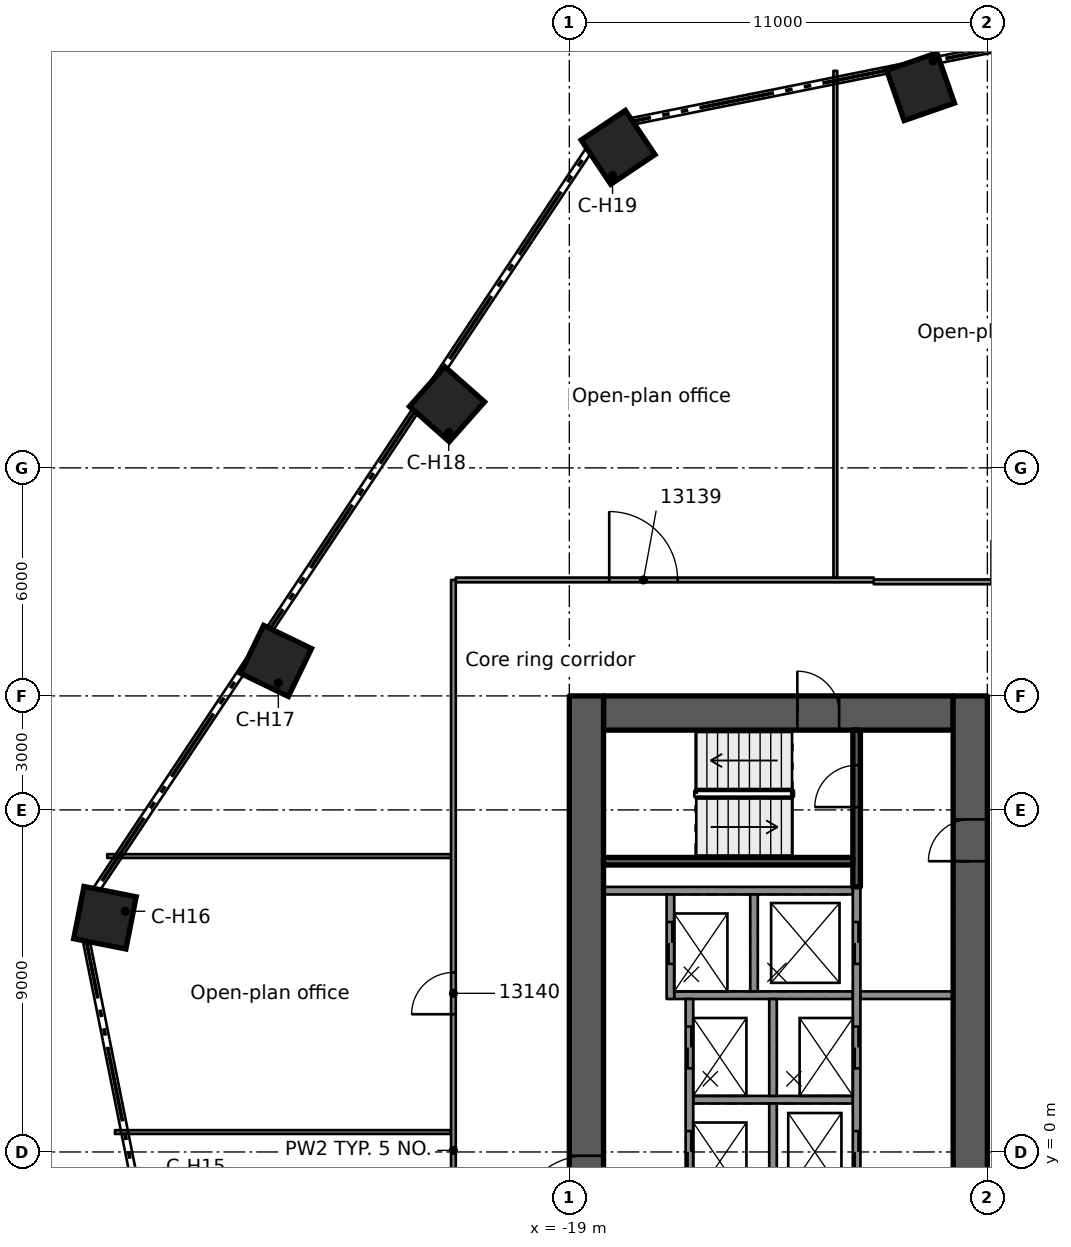
"""IFC4 building model, lengths in metres.
Left out: names, types, materials, properties, quantities, classifications, styles, units other than length and angle.
Written with IfcOpenShell. Run it as: python <this file> out.ifc"""

import sys

from ifc_helpers import new_model, si_unit, direction, frame, frame_2d, origin, origin_2d, place, context, subcontext, project, spatial, rectangle, extrude, element, fill, save


model = new_model("IFC4")
c1 = context("Model", 3, precision=1e-05, world=origin(), true_north=direction((0.0, 1.0)))
c2 = subcontext(c1, "Body", "Model", "MODEL_VIEW")
j1 = project(units=[si_unit("LENGTHUNIT", "METRE"), si_unit("PLANEANGLEUNIT", "RADIAN")], contexts=[c1])
p1 = place(None, origin())
s1 = spatial("IfcSite", under=j1, at=p1, CompositionType="ELEMENT")
p2 = place(p1, origin())
s2 = spatial("IfcBuilding", under=s1, at=p2, CompositionType="ELEMENT")
p3 = place(p2, frame((0.0, 0.0, 62.3)))
s3 = spatial("IfcBuildingStorey", under=s2, at=p3, CompositionType="ELEMENT", Elevation=62.3)
p4 = place(p3, frame((-18.1, 11.55, 0.0), z_axis=(0.0, 0.0, 1.0), x_axis=(1.0, 0.0, 0.0)))
e1 = element("IfcWall", 1, at=p4, inside=s3, PredefinedType="SHEAR", context=c2, shape_type="SweptSolid", body=[
    extrude(rectangle(XDim=9.2, YDim=0.9, at=frame_2d((4.6, 0.0))), origin(), (0.0, 0.0, 1.0), 3.5),
])
p5 = place(p4, frame((5.1, 0.0, 0.0)))
e2 = element("IfcOpeningElement", 2, at=p5, cuts=e1, PredefinedType="OPENING", context=c2, shape_type="SweptSolid", body=[
    extrude(rectangle(XDim=1.1, YDim=2.1, at=frame_2d((0.55, 1.05))), frame((0.0, 0.46, 0.0), z_axis=(0.0, -1.0, 0.0), x_axis=(1.0, 0.0, 0.0)), (0.0, 0.0, 1.0), 0.92),
])
p6 = place(p3, frame((-18.55, -12.0, 0.0), z_axis=(0.0, 0.0, 1.0), x_axis=(0.0, 1.0, 0.0)))
e3 = element("IfcWall", 3, at=p6, inside=s3, PredefinedType="SHEAR", context=c2, shape_type="SweptSolid", body=[
    extrude(rectangle(XDim=24.0, YDim=0.9, at=frame_2d((12.0, 0.0))), origin(), (0.0, 0.0, 1.0), 3.5),
])
p7 = place(p6, frame((10.1, 0.0, 0.0)))
e4 = element("IfcOpeningElement", 4, at=p7, cuts=e3, PredefinedType="OPENING", context=c2, shape_type="SweptSolid", body=[
    extrude(rectangle(XDim=1.8, YDim=2.1, at=frame_2d((0.9, 1.05))), frame((0.0, 0.46, 0.0), z_axis=(0.0, -1.0, 0.0), x_axis=(1.0, 0.0, 0.0)), (0.0, 0.0, 1.0), 0.92),
])
p8 = place(p3, frame((-8.45, -12.0, 0.0), z_axis=(0.0, 0.0, 1.0), x_axis=(0.0, 1.0, 0.0)))
e5 = element("IfcWall", 5, at=p8, inside=s3, PredefinedType="SHEAR", context=c2, shape_type="SweptSolid", body=[
    extrude(rectangle(XDim=24.0, YDim=0.9, at=frame_2d((12.0, 0.0))), origin(), (0.0, 0.0, 1.0), 3.5),
])
p9 = place(p8, frame((9.6, 0.0, 0.0)))
e6 = element("IfcOpeningElement", 6, at=p9, cuts=e5, PredefinedType="OPENING", context=c2, shape_type="SweptSolid", body=[
    extrude(rectangle(XDim=1.8, YDim=2.1, at=frame_2d((0.9, 1.05))), frame((0.0, 0.46, 0.0), z_axis=(0.0, -1.0, 0.0), x_axis=(1.0, 0.0, 0.0)), (0.0, 0.0, 1.0), 0.92),
])
p10 = place(p8, frame((19.65, 0.0, 0.0)))
e7 = element("IfcOpeningElement", 7, at=p10, cuts=e5, PredefinedType="OPENING", context=c2, shape_type="SweptSolid", body=[
    extrude(rectangle(XDim=1.1, YDim=2.1, at=frame_2d((0.55, 1.05))), frame((0.0, 0.46, 0.0), z_axis=(0.0, -1.0, 0.0), x_axis=(1.0, 0.0, 0.0)), (0.0, 0.0, 1.0), 0.92),
])
for number, where, z_axis, x_axis in (
    (8, (-31.22, 6.163, 0.0), (0.0, 0.0, 1.0), (-0.981, 0.194, 0.0)),
    (9, (-26.719, 12.92, 0.0), (0.0, 0.0, 1.0), (-0.9, 0.435, 0.0)),
    (10, (-22.219, 19.677, 0.0), (0.0, 0.0, 1.0), (-0.749, 0.663, 0.0)),
    (11, (-17.718, 26.434, 0.0), (0.0, 0.0, 1.0), (-0.557, 0.831, 0.0)),
    (12, (-9.758, 28.029, 0.0), (0.0, 0.0, 1.0), (-0.329, 0.944, 0.0)),
):
    element("IfcColumn", number, at=place(p3, frame(where, z_axis=z_axis, x_axis=x_axis)), inside=s3, PredefinedType="COLUMN", context=c2, shape_type="SweptSolid", body=[
        extrude(rectangle(XDim=1.4, YDim=1.4, at=origin_2d()), origin(), (0.0, 0.0, 1.0), 3.5),
    ])
p11 = place(p3, frame((-11.54, 6.875, 0.0), z_axis=(0.0, 0.0, 1.0), x_axis=(-1.0, 0.0, 0.0)))
e13 = element("IfcWall", 13, at=p11, inside=s3, PredefinedType="SOLIDWALL", context=c2, shape_type="SweptSolid", body=[
    extrude(rectangle(XDim=6.56, YDim=0.2, at=frame_2d((3.28, 0.0))), origin(), (0.0, 0.0, 1.0), 3.09),
])
p12 = place(p3, frame((-11.54, 1.375, 0.0), z_axis=(0.0, 0.0, 1.0), x_axis=(-1.0, 0.0, 0.0)))
e14 = element("IfcWall", 14, at=p12, inside=s3, PredefinedType="SOLIDWALL", context=c2, shape_type="SweptSolid", body=[
    extrude(rectangle(XDim=4.2, YDim=0.2, at=frame_2d((2.1, 0.0))), origin(), (0.0, 0.0, 1.0), 3.09),
])
p13 = place(p3, frame((-11.54, 4.125, 0.0), z_axis=(0.0, 0.0, 1.0), x_axis=(-1.0, 0.0, 0.0)))
e15 = element("IfcWall", 15, at=p13, inside=s3, PredefinedType="SOLIDWALL", context=c2, shape_type="SweptSolid", body=[
    extrude(rectangle(XDim=4.7, YDim=0.2, at=frame_2d((2.35, 0.0))), origin(), (0.0, 0.0, 1.0), 3.09),
])
p14 = place(p3, frame((-11.44, -6.975, 0.0), z_axis=(0.0, 0.0, 1.0), x_axis=(0.0, 1.0, 0.0)))
e16 = element("IfcWall", 16, at=p14, inside=s3, PredefinedType="SOLIDWALL", context=c2, shape_type="SweptSolid", body=[
    extrude(rectangle(XDim=13.95, YDim=0.2, at=frame_2d((6.975, 0.0))), origin(), (0.0, 0.0, 1.0), 3.09),
])
p15 = place(p14, frame((6.425, 0.0, 0.0)))
e17 = element("IfcOpeningElement", 17, at=p15, cuts=e16, PredefinedType="OPENING", context=c2, shape_type="SweptSolid", body=[
    extrude(rectangle(XDim=1.1, YDim=2.1, at=frame_2d((0.55, 1.05))), frame((0.0, 0.11, 0.0), z_axis=(0.0, -1.0, 0.0), x_axis=(1.0, 0.0, 0.0)), (0.0, 0.0, 1.0), 0.22),
])
p16 = place(p14, frame((9.175, 0.0, 0.0)))
e18 = element("IfcOpeningElement", 18, at=p16, cuts=e16, PredefinedType="OPENING", context=c2, shape_type="SweptSolid", body=[
    extrude(rectangle(XDim=1.1, YDim=2.1, at=frame_2d((0.55, 1.05))), frame((0.0, 0.11, 0.0), z_axis=(0.0, -1.0, 0.0), x_axis=(1.0, 0.0, 0.0)), (0.0, 0.0, 1.0), 0.22),
])
p17 = place(p14, frame((11.925, 0.0, 0.0)))
e19 = element("IfcOpeningElement", 19, at=p17, cuts=e16, PredefinedType="OPENING", context=c2, shape_type="SweptSolid", body=[
    extrude(rectangle(XDim=1.1, YDim=2.1, at=frame_2d((0.55, 1.05))), frame((0.0, 0.11, 0.0), z_axis=(0.0, -1.0, 0.0), x_axis=(1.0, 0.0, 0.0)), (0.0, 0.0, 1.0), 0.22),
])
p18 = place(p14, frame((1.075, 0.0, 0.0)))
e20 = element("IfcOpeningElement", 20, at=p18, cuts=e16, PredefinedType="OPENING", context=c2, shape_type="SweptSolid", body=[
    extrude(rectangle(XDim=0.8, YDim=2.1, at=frame_2d((0.4, 1.05))), frame((0.0, 0.11, 0.0), z_axis=(0.0, -1.0, 0.0), x_axis=(1.0, 0.0, 0.0)), (0.0, 0.0, 1.0), 0.22),
])
for number, where, z_axis, x_axis in (
    (21, (-13.64, -1.275, 0.0), (0.0, 0.0, 1.0), (0.0, 1.0, 0.0)),
    (22, (-13.64, 1.475, 0.0), (0.0, 0.0, 1.0), (0.0, 1.0, 0.0)),
    (23, (-14.14, 4.225, 0.0), (0.0, 0.0, 1.0), (0.0, 1.0, 0.0)),
):
    element("IfcWall", number, at=place(p3, frame(where, z_axis=z_axis, x_axis=x_axis)), inside=s3, PredefinedType="SOLIDWALL", context=c2, shape_type="SweptSolid", body=[
        extrude(rectangle(XDim=2.55, YDim=0.2, at=frame_2d((1.275, 0.0))), origin(), (0.0, 0.0, 1.0), 3.09),
    ])
p19 = place(p3, frame((-15.84, -4.025, 0.0), z_axis=(0.0, 0.0, 1.0), x_axis=(0.0, 1.0, 0.0)))
e24 = element("IfcWall", 24, at=p19, inside=s3, PredefinedType="SOLIDWALL", context=c2, shape_type="SweptSolid", body=[
    extrude(rectangle(XDim=8.05, YDim=0.2, at=frame_2d((4.025, 0.0))), origin(), (0.0, 0.0, 1.0), 3.09),
])
p20 = place(p19, frame((3.475, 0.0, 0.0)))
e25 = element("IfcOpeningElement", 25, at=p20, cuts=e24, PredefinedType="OPENING", context=c2, shape_type="SweptSolid", body=[
    extrude(rectangle(XDim=1.1, YDim=2.1, at=frame_2d((0.55, 1.05))), frame((0.0, 0.11, 0.0), z_axis=(0.0, -1.0, 0.0), x_axis=(1.0, 0.0, 0.0)), (0.0, 0.0, 1.0), 0.22),
])
p21 = place(p19, frame((6.225, 0.0, 0.0)))
e26 = element("IfcOpeningElement", 26, at=p21, cuts=e24, PredefinedType="OPENING", context=c2, shape_type="SweptSolid", body=[
    extrude(rectangle(XDim=1.1, YDim=2.1, at=frame_2d((0.55, 1.05))), frame((0.0, 0.11, 0.0), z_axis=(0.0, -1.0, 0.0), x_axis=(1.0, 0.0, 0.0)), (0.0, 0.0, 1.0), 0.22),
])
p22 = place(p3, frame((-16.34, 4.025, 0.0), z_axis=(0.0, 0.0, 1.0), x_axis=(0.0, 1.0, 0.0)))
e27 = element("IfcWall", 27, at=p22, inside=s3, PredefinedType="SOLIDWALL", context=c2, shape_type="SweptSolid", body=[
    extrude(rectangle(XDim=2.75, YDim=0.2, at=frame_2d((1.375, 0.0))), origin(), (0.0, 0.0, 1.0), 3.09),
])
p23 = place(p22, frame((0.925, 0.0, 0.0)))
e28 = element("IfcOpeningElement", 28, at=p23, cuts=e27, PredefinedType="OPENING", context=c2, shape_type="SweptSolid", body=[
    extrude(rectangle(XDim=1.1, YDim=2.1, at=frame_2d((0.55, 1.05))), frame((0.0, 0.11, 0.0), z_axis=(0.0, -1.0, 0.0), x_axis=(1.0, 0.0, 0.0)), (0.0, 0.0, 1.0), 0.22),
])
p24 = place(p3, frame((-11.44, 6.975, 0.0), z_axis=(0.0, 0.0, 1.0), x_axis=(0.0, 1.0, 0.0)))
e29 = element("IfcWall", 29, at=p24, inside=s3, PredefinedType="SOLIDWALL", context=c2, shape_type="SweptSolid", body=[
    extrude(rectangle(XDim=4.125, YDim=0.2, at=frame_2d((2.062, 0.0))), origin(), (0.0, 0.0, 1.0), 3.09),
])
p25 = place(p24, frame((2.1, 0.0, 0.0)))
e30 = element("IfcOpeningElement", 30, at=p25, cuts=e29, PredefinedType="OPENING", context=c2, shape_type="SweptSolid", body=[
    extrude(rectangle(XDim=1.1, YDim=2.1, at=frame_2d((0.55, 1.05))), frame((0.0, 0.11, 0.0), z_axis=(0.0, -1.0, 0.0), x_axis=(1.0, 0.0, 0.0)), (0.0, 0.0, 1.0), 0.22),
])
p26 = place(p3, frame((-11.54, 7.65, 0.0), z_axis=(0.0, 0.0, 1.0), x_axis=(-1.0, 0.0, 0.0)))
e31 = element("IfcWall", 31, at=p26, inside=s3, PredefinedType="SOLIDWALL", context=c2, shape_type="SweptSolid", body=[
    extrude(rectangle(XDim=6.56, YDim=0.2, at=frame_2d((3.28, 0.0))), origin(), (0.0, 0.0, 1.0), 3.09),
])
p27 = place(p3, frame((-8.9, 4.125, 0.0), z_axis=(0.0, 0.0, 1.0), x_axis=(-1.0, 0.0, 0.0)))
e32 = element("IfcWall", 32, at=p27, inside=s3, PredefinedType="PARTITIONING", context=c2, shape_type="SweptSolid", body=[
    extrude(rectangle(XDim=2.44, YDim=0.2, at=frame_2d((1.22, 0.0))), origin(), (0.0, 0.0, 1.0), 3.09),
])
p28 = place(p3, frame((-30.956, 0.524, 0.0), z_axis=(0.0, 0.0, 1.0), x_axis=(1.0, 0.0, 0.0)))
e33 = element("IfcWall", 33, at=p28, inside=s3, PredefinedType="PARTITIONING", context=c2, shape_type="SweptSolid", body=[
    extrude(rectangle(XDim=8.843, YDim=0.1, at=frame_2d((4.421, 0.0))), origin(), (0.0, 0.0, 1.0), 3.08),
])
p29 = place(p3, frame((-31.16, 7.786, 0.0), z_axis=(0.0, 0.0, 1.0), x_axis=(1.0, 0.0, 0.0)))
e34 = element("IfcWall", 34, at=p29, inside=s3, PredefinedType="PARTITIONING", context=c2, shape_type="SweptSolid", body=[
    extrude(rectangle(XDim=9.047, YDim=0.1, at=frame_2d((4.523, 0.0))), origin(), (0.0, 0.0, 1.0), 3.08),
])
p30 = place(p3, frame((-10.99, 15.001, 0.0), z_axis=(0.0, 0.0, 1.0), x_axis=(1.0, 0.0, 0.0)))
e35 = element("IfcWall", 35, at=p30, inside=s3, PredefinedType="PARTITIONING", context=c2, shape_type="SweptSolid", body=[
    extrude(rectangle(XDim=21.98, YDim=0.125, at=frame_2d((10.99, 0.0))), origin(), (0.0, 0.0, 1.0), 3.08),
])
p31 = place(p30, frame((17.59, 0.0, 0.0)))
e36 = element("IfcOpeningElement", 36, at=p31, cuts=e35, PredefinedType="OPENING", context=c2, shape_type="SweptSolid", body=[
    extrude(rectangle(XDim=1.8, YDim=2.1, at=frame_2d((0.9, 1.05))), frame((0.0, 0.073, 0.0), z_axis=(0.0, -1.0, 0.0), x_axis=(1.0, 0.0, 0.0)), (0.0, 0.0, 1.0), 0.145),
])
p32 = place(p30, frame((10.595, 0.0, 0.0)))
e37 = element("IfcOpeningElement", 37, at=p32, cuts=e35, PredefinedType="OPENING", context=c2, shape_type="SweptSolid", body=[
    extrude(rectangle(XDim=1.1, YDim=2.1, at=frame_2d((0.55, 1.05))), frame((0.0, 0.073, 0.0), z_axis=(0.0, -1.0, 0.0), x_axis=(1.0, 0.0, 0.0)), (0.0, 0.0, 1.0), 0.145),
])
p33 = place(p30, frame((3.1, 0.0, 0.0)))
e38 = element("IfcOpeningElement", 38, at=p33, cuts=e35, PredefinedType="OPENING", context=c2, shape_type="SweptSolid", body=[
    extrude(rectangle(XDim=1.1, YDim=2.1, at=frame_2d((0.55, 1.05))), frame((0.0, 0.073, 0.0), z_axis=(0.0, -1.0, 0.0), x_axis=(1.0, 0.0, 0.0)), (0.0, 0.0, 1.0), 0.145),
])
p34 = place(p3, frame((-21.988, 15.051, 0.0), z_axis=(0.0, 0.0, 1.0), x_axis=(1.0, 0.0, 0.0)))
e39 = element("IfcWall", 39, at=p34, inside=s3, PredefinedType="PARTITIONING", context=c2, shape_type="SweptSolid", body=[
    extrude(rectangle(XDim=10.997, YDim=0.125, at=frame_2d((5.499, 0.0))), origin(), (0.0, 0.0, 1.0), 3.08),
])
p35 = place(p34, frame((4.038, 0.0, 0.0)))
e40 = element("IfcOpeningElement", 40, at=p35, cuts=e39, PredefinedType="OPENING", context=c2, shape_type="SweptSolid", body=[
    extrude(rectangle(XDim=1.8, YDim=2.1, at=frame_2d((0.9, 1.05))), frame((0.0, 0.073, 0.0), z_axis=(0.0, -1.0, 0.0), x_axis=(1.0, 0.0, 0.0)), (0.0, 0.0, 1.0), 0.145),
])
p36 = place(p3, frame((-12.0, 15.114, 0.0), z_axis=(0.0, 0.0, 1.0), x_axis=(0.0, 1.0, 0.0)))
e41 = element("IfcWall", 41, at=p36, inside=s3, PredefinedType="PARTITIONING", context=c2, shape_type="SweptSolid", body=[
    extrude(rectangle(XDim=13.333, YDim=0.1, at=frame_2d((6.667, 0.0))), origin(), (0.0, 0.0, 1.0), 3.08),
])
p37 = place(p3, frame((-22.05, -14.967, 0.0), z_axis=(0.0, 0.0, 1.0), x_axis=(0.0, 1.0, 0.0)))
e42 = element("IfcWall", 42, at=p37, inside=s3, PredefinedType="PARTITIONING", context=c2, shape_type="SweptSolid", body=[
    extrude(rectangle(XDim=30.018, YDim=0.125, at=frame_2d((15.009, 0.0))), origin(), (0.0, 0.0, 1.0), 3.08),
])
p38 = place(p37, frame((7.317, 0.0, 0.0)))
e43 = element("IfcOpeningElement", 43, at=p38, cuts=e42, PredefinedType="OPENING", context=c2, shape_type="SweptSolid", body=[
    extrude(rectangle(XDim=1.8, YDim=2.1, at=frame_2d((0.9, 1.05))), frame((0.0, 0.073, 0.0), z_axis=(0.0, -1.0, 0.0), x_axis=(1.0, 0.0, 0.0)), (0.0, 0.0, 1.0), 0.145),
])
p39 = place(p37, frame((18.591, 0.0, 0.0)))
e44 = element("IfcOpeningElement", 44, at=p39, cuts=e42, PredefinedType="OPENING", context=c2, shape_type="SweptSolid", body=[
    extrude(rectangle(XDim=1.1, YDim=2.1, at=frame_2d((0.55, 1.05))), frame((0.0, 0.073, 0.0), z_axis=(0.0, -1.0, 0.0), x_axis=(1.0, 0.0, 0.0)), (0.0, 0.0, 1.0), 0.145),
])
p40 = place(p15, origin())
e45 = element("IfcDoor", 45, at=p40, inside=s3, OperationType="DOUBLE_DOOR_SLIDING", PredefinedType="DOOR", context=c2, shape_type="SweptSolid", body=[
    extrude(rectangle(XDim=1.1, YDim=2.1, at=frame_2d((0.55, 1.05))), frame((0.0, 0.025, 0.0), z_axis=(0.0, -1.0, 0.0), x_axis=(1.0, 0.0, 0.0)), (0.0, 0.0, 1.0), 0.05),
])
fill(e17, e45)
p41 = place(p20, origin())
e46 = element("IfcDoor", 46, at=p41, inside=s3, OperationType="DOUBLE_DOOR_SLIDING", PredefinedType="DOOR", context=c2, shape_type="SweptSolid", body=[
    extrude(rectangle(XDim=1.1, YDim=2.1, at=frame_2d((0.55, 1.05))), frame((0.0, 0.025, 0.0), z_axis=(0.0, -1.0, 0.0), x_axis=(1.0, 0.0, 0.0)), (0.0, 0.0, 1.0), 0.05),
])
fill(e25, e46)
p42 = place(p16, origin())
e47 = element("IfcDoor", 47, at=p42, inside=s3, OperationType="DOUBLE_DOOR_SLIDING", PredefinedType="DOOR", context=c2, shape_type="SweptSolid", body=[
    extrude(rectangle(XDim=1.1, YDim=2.1, at=frame_2d((0.55, 1.05))), frame((0.0, 0.025, 0.0), z_axis=(0.0, -1.0, 0.0), x_axis=(1.0, 0.0, 0.0)), (0.0, 0.0, 1.0), 0.05),
])
fill(e18, e47)
p43 = place(p21, origin())
e48 = element("IfcDoor", 48, at=p43, inside=s3, OperationType="DOUBLE_DOOR_SLIDING", PredefinedType="DOOR", context=c2, shape_type="SweptSolid", body=[
    extrude(rectangle(XDim=1.1, YDim=2.1, at=frame_2d((0.55, 1.05))), frame((0.0, 0.025, 0.0), z_axis=(0.0, -1.0, 0.0), x_axis=(1.0, 0.0, 0.0)), (0.0, 0.0, 1.0), 0.05),
])
fill(e26, e48)
p44 = place(p17, origin())
e49 = element("IfcDoor", 49, at=p44, inside=s3, OperationType="DOUBLE_DOOR_SLIDING", PredefinedType="DOOR", context=c2, shape_type="SweptSolid", body=[
    extrude(rectangle(XDim=1.1, YDim=2.1, at=frame_2d((0.55, 1.05))), frame((0.0, 0.025, 0.0), z_axis=(0.0, -1.0, 0.0), x_axis=(1.0, 0.0, 0.0)), (0.0, 0.0, 1.0), 0.05),
])
fill(e19, e49)
p45 = place(p23, origin())
e50 = element("IfcDoor", 50, at=p45, inside=s3, OperationType="DOUBLE_DOOR_SLIDING", PredefinedType="DOOR", context=c2, shape_type="SweptSolid", body=[
    extrude(rectangle(XDim=1.1, YDim=2.1, at=frame_2d((0.55, 1.05))), frame((0.0, 0.025, 0.0), z_axis=(0.0, -1.0, 0.0), x_axis=(1.0, 0.0, 0.0)), (0.0, 0.0, 1.0), 0.05),
])
fill(e28, e50)
p46 = place(p7, origin())
e51 = element("IfcDoor", 51, at=p46, inside=s3, OperationType="SINGLE_SWING_LEFT", PredefinedType="DOOR", context=c2, shape_type="SweptSolid", body=[
    extrude(rectangle(XDim=1.8, YDim=2.1, at=frame_2d((0.9, 1.05))), frame((0.0, 0.025, 0.0), z_axis=(0.0, -1.0, 0.0), x_axis=(1.0, 0.0, 0.0)), (0.0, 0.0, 1.0), 0.05),
])
fill(e4, e51)
p47 = place(p10, origin())
e52 = element("IfcDoor", 52, at=p47, inside=s3, OperationType="SINGLE_SWING_RIGHT", PredefinedType="DOOR", context=c2, shape_type="SweptSolid", body=[
    extrude(rectangle(XDim=1.1, YDim=2.1, at=frame_2d((0.55, 1.05))), frame((0.0, 0.025, 0.0), z_axis=(0.0, -1.0, 0.0), x_axis=(1.0, 0.0, 0.0)), (0.0, 0.0, 1.0), 0.05),
])
fill(e7, e52)
p48 = place(p5, origin())
e53 = element("IfcDoor", 53, at=p48, inside=s3, OperationType="SINGLE_SWING_RIGHT", PredefinedType="DOOR", context=c2, shape_type="SweptSolid", body=[
    extrude(rectangle(XDim=1.1, YDim=2.1, at=frame_2d((0.55, 1.05))), frame((0.0, 0.025, 0.0), z_axis=(0.0, -1.0, 0.0), x_axis=(1.0, 0.0, 0.0)), (0.0, 0.0, 1.0), 0.05),
])
fill(e2, e53)
p49 = place(p25, origin())
e54 = element("IfcDoor", 54, at=p49, inside=s3, OperationType="SINGLE_SWING_RIGHT", PredefinedType="DOOR", context=c2, shape_type="SweptSolid", body=[
    extrude(rectangle(XDim=1.1, YDim=2.1, at=frame_2d((0.55, 1.05))), frame((0.0, 0.025, 0.0), z_axis=(0.0, -1.0, 0.0), x_axis=(1.0, 0.0, 0.0)), (0.0, 0.0, 1.0), 0.05),
])
fill(e30, e54)
p50 = place(p35, origin())
e55 = element("IfcDoor", 55, at=p50, inside=s3, OperationType="DOUBLE_DOOR_SINGLE_SWING", PredefinedType="DOOR", context=c2, shape_type="SweptSolid", body=[
    extrude(rectangle(XDim=1.8, YDim=2.1, at=frame_2d((0.9, 1.05))), frame((0.0, 0.025, 0.0), z_axis=(0.0, -1.0, 0.0), x_axis=(1.0, 0.0, 0.0)), (0.0, 0.0, 1.0), 0.05),
])
fill(e40, e55)
p51 = place(p39, origin())
e56 = element("IfcDoor", 56, at=p51, inside=s3, OperationType="SINGLE_SWING_RIGHT", PredefinedType="DOOR", context=c2, shape_type="SweptSolid", body=[
    extrude(rectangle(XDim=1.1, YDim=2.1, at=frame_2d((0.55, 1.05))), frame((0.0, 0.025, 0.0), z_axis=(0.0, -1.0, 0.0), x_axis=(1.0, 0.0, 0.0)), (0.0, 0.0, 1.0), 0.05),
])
fill(e44, e56)
save(model, sys.argv[1])
